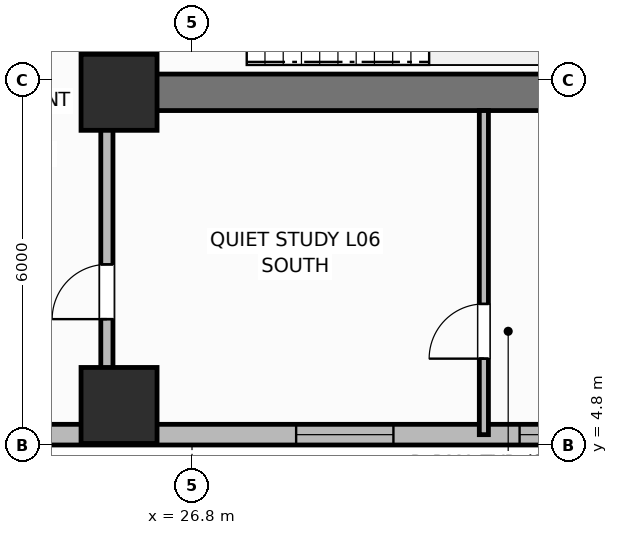
"""IFC4 building model, lengths in metres.
Left out: names, types, materials, properties, quantities, classifications, styles, units other than length and angle.
Written with IfcOpenShell. Run it as: python <this file> out.ifc"""

import sys

from ifc_helpers import new_model, si_unit, direction, frame, frame_2d, origin, origin_2d, place, context, subcontext, project, spatial, rectangle, extrude, element, fill, save


model = new_model("IFC4")
c1 = context("Model", 3, precision=1e-05, world=origin(), true_north=direction((0.0, 1.0)))
c2 = subcontext(c1, "Body", "Model", "MODEL_VIEW")
j1 = project(units=[si_unit("LENGTHUNIT", "METRE"), si_unit("PLANEANGLEUNIT", "RADIAN")], contexts=[c1])
p1 = place(None, origin())
s1 = spatial("IfcSite", under=j1, at=p1, CompositionType="ELEMENT")
p2 = place(p1, origin())
s2 = spatial("IfcBuilding", under=s1, at=p2, CompositionType="ELEMENT")
p3 = place(p2, frame((0.0, 0.0, 28.8)))
s3 = spatial("IfcBuildingStorey", under=s2, at=p3, CompositionType="ELEMENT", Elevation=28.8)
p4 = place(p3, frame((52.8, 10.6, 0.0), z_axis=(0.0, 0.0, 1.0), x_axis=(-1.0, 0.0, 0.0)))
e1 = element("IfcWall", 1, at=p4, inside=s3, PredefinedType="SHEAR", context=c2, shape_type="SweptSolid", body=[
    extrude(rectangle(XDim=27.2, YDim=0.6, at=frame_2d((13.6, 0.0))), origin(), (0.0, 0.0, 1.0), 3.7),
])
p5 = place(p3, frame((25.6, 10.9, 0.0), z_axis=(0.0, 0.0, 1.0), x_axis=(0.0, 1.0, 0.0)))
e2 = element("IfcWall", 2, at=p5, inside=s3, PredefinedType="SHEAR", context=c2, shape_type="SweptSolid", body=[
    extrude(rectangle(XDim=5.6, YDim=0.6, at=frame_2d((2.8, 0.0))), origin(), (0.0, 0.0, 1.0), 3.7),
])
for number, where, z_axis, x_axis in (
    (3, (25.6, 10.6, 0.0), (0.0, 0.0, 1.0), (1.0, 0.0, 0.0)),
    (4, (25.6, 5.45, 0.0), (0.0, 0.0, 1.0), (1.0, 0.0, 0.0)),
):
    element("IfcColumn", number, at=place(p3, frame(where, z_axis=z_axis, x_axis=x_axis)), inside=s3, PredefinedType="COLUMN", context=c2, shape_type="SweptSolid", body=[
        extrude(rectangle(XDim=1.25, YDim=1.25, at=origin_2d()), origin(), (0.0, 0.0, 1.0), 3.7),
    ])
p6 = place(p3, frame((18.6, 4.97, 0.0), z_axis=(0.0, 0.0, 1.0), x_axis=(1.0, 0.0, 0.0)))
e5 = element("IfcWall", 5, at=p6, inside=s3, PredefinedType="SOLIDWALL", context=c2, shape_type="SweptSolid", body=[
    extrude(rectangle(XDim=17.4, YDim=0.34, at=frame_2d((8.7, 0.0))), origin(), (0.0, 0.0, 1.0), 2.7),
])
p7 = place(p6, frame((1.863, 0.0, 0.68)))
e6 = element("IfcOpeningElement", 6, at=p7, cuts=e5, PredefinedType="OPENING", context=c2, shape_type="SweptSolid", body=[
    extrude(rectangle(XDim=1.6, YDim=1.9, at=frame_2d((0.8, 0.95))), frame((0.0, 0.18, 0.0), z_axis=(0.0, -1.0, 0.0), x_axis=(1.0, 0.0, 0.0)), (0.0, 0.0, 1.0), 0.36),
])
p8 = place(p6, frame((9.913, 0.0, 0.68)))
e7 = element("IfcOpeningElement", 7, at=p8, cuts=e5, PredefinedType="OPENING", context=c2, shape_type="SweptSolid", body=[
    extrude(rectangle(XDim=1.6, YDim=1.9, at=frame_2d((0.8, 0.95))), frame((0.0, 0.18, 0.0), z_axis=(0.0, -1.0, 0.0), x_axis=(1.0, 0.0, 0.0)), (0.0, 0.0, 1.0), 0.36),
])
p9 = place(p6, frame((13.587, 0.0, 0.68)))
e8 = element("IfcOpeningElement", 8, at=p9, cuts=e5, PredefinedType="OPENING", context=c2, shape_type="SweptSolid", body=[
    extrude(rectangle(XDim=1.6, YDim=1.9, at=frame_2d((0.8, 0.95))), frame((0.0, 0.18, 0.0), z_axis=(0.0, -1.0, 0.0), x_axis=(1.0, 0.0, 0.0)), (0.0, 0.0, 1.0), 0.36),
])
p10 = place(p3, frame((31.6, 4.97, 0.0), z_axis=(0.0, 0.0, 1.0), x_axis=(0.0, 1.0, 0.0)))
e9 = element("IfcWall", 9, at=p10, inside=s3, PredefinedType="PARTITIONING", context=c2, shape_type="SweptSolid", body=[
    extrude(rectangle(XDim=5.33, YDim=0.15, at=frame_2d((2.665, 0.0))), origin(), (0.0, 0.0, 1.0), 2.53),
])
p11 = place(p10, frame((1.25, 0.0, 0.0)))
e10 = element("IfcOpeningElement", 10, at=p11, cuts=e9, PredefinedType="OPENING", context=c2, shape_type="SweptSolid", body=[
    extrude(rectangle(XDim=0.9, YDim=2.1, at=frame_2d((0.45, 1.05))), frame((0.0, 0.085, 0.0), z_axis=(0.0, -1.0, 0.0), x_axis=(1.0, 0.0, 0.0)), (0.0, 0.0, 1.0), 0.17),
])
p12 = place(p3, frame((25.4, 5.57, 0.0), z_axis=(0.0, 0.0, 1.0), x_axis=(0.0, 1.0, 0.0)))
e11 = element("IfcWall", 11, at=p12, inside=s3, PredefinedType="PARTITIONING", context=c2, shape_type="SweptSolid", body=[
    extrude(rectangle(XDim=4.73, YDim=0.2, at=frame_2d((2.365, 0.0))), origin(), (0.0, 0.0, 1.0), 2.53),
])
p13 = place(p12, frame((1.3, 0.0, 0.0)))
e12 = element("IfcOpeningElement", 12, at=p13, cuts=e11, PredefinedType="OPENING", context=c2, shape_type="SweptSolid", body=[
    extrude(rectangle(XDim=0.9, YDim=2.1, at=frame_2d((0.45, 1.05))), frame((0.0, 0.11, 0.0), z_axis=(0.0, -1.0, 0.0), x_axis=(1.0, 0.0, 0.0)), (0.0, 0.0, 1.0), 0.22),
])
p14 = place(p8, origin())
e13 = element("IfcWindow", 13, at=p14, inside=s3, PartitioningType="SINGLE_PANEL", PredefinedType="WINDOW", context=c2, shape_type="SweptSolid", body=[
    extrude(rectangle(XDim=1.6, YDim=1.9, at=frame_2d((0.8, 0.95))), frame((0.0, 0.03, 0.0), z_axis=(0.0, -1.0, 0.0), x_axis=(1.0, 0.0, 0.0)), (0.0, 0.0, 1.0), 0.06),
])
fill(e7, e13)
p15 = place(p9, origin())
e14 = element("IfcWindow", 14, at=p15, inside=s3, PartitioningType="SINGLE_PANEL", PredefinedType="WINDOW", context=c2, shape_type="SweptSolid", body=[
    extrude(rectangle(XDim=1.6, YDim=1.9, at=frame_2d((0.8, 0.95))), frame((0.0, 0.03, 0.0), z_axis=(0.0, -1.0, 0.0), x_axis=(1.0, 0.0, 0.0)), (0.0, 0.0, 1.0), 0.06),
])
fill(e8, e14)
p16 = place(p11, origin())
e15 = element("IfcDoor", 15, at=p16, inside=s3, OperationType="SINGLE_SWING_LEFT", PredefinedType="DOOR", context=c2, shape_type="SweptSolid", body=[
    extrude(rectangle(XDim=0.9, YDim=2.1, at=frame_2d((0.45, 1.05))), frame((0.0, 0.025, 0.0), z_axis=(0.0, -1.0, 0.0), x_axis=(1.0, 0.0, 0.0)), (0.0, 0.0, 1.0), 0.05),
])
fill(e10, e15)
p17 = place(p13, origin())
e16 = element("IfcDoor", 16, at=p17, inside=s3, OperationType="SINGLE_SWING_LEFT", PredefinedType="DOOR", context=c2, shape_type="SweptSolid", body=[
    extrude(rectangle(XDim=0.9, YDim=2.1, at=frame_2d((0.45, 1.05))), frame((0.0, 0.025, 0.0), z_axis=(0.0, -1.0, 0.0), x_axis=(1.0, 0.0, 0.0)), (0.0, 0.0, 1.0), 0.05),
])
fill(e12, e16)
save(model, sys.argv[1])
